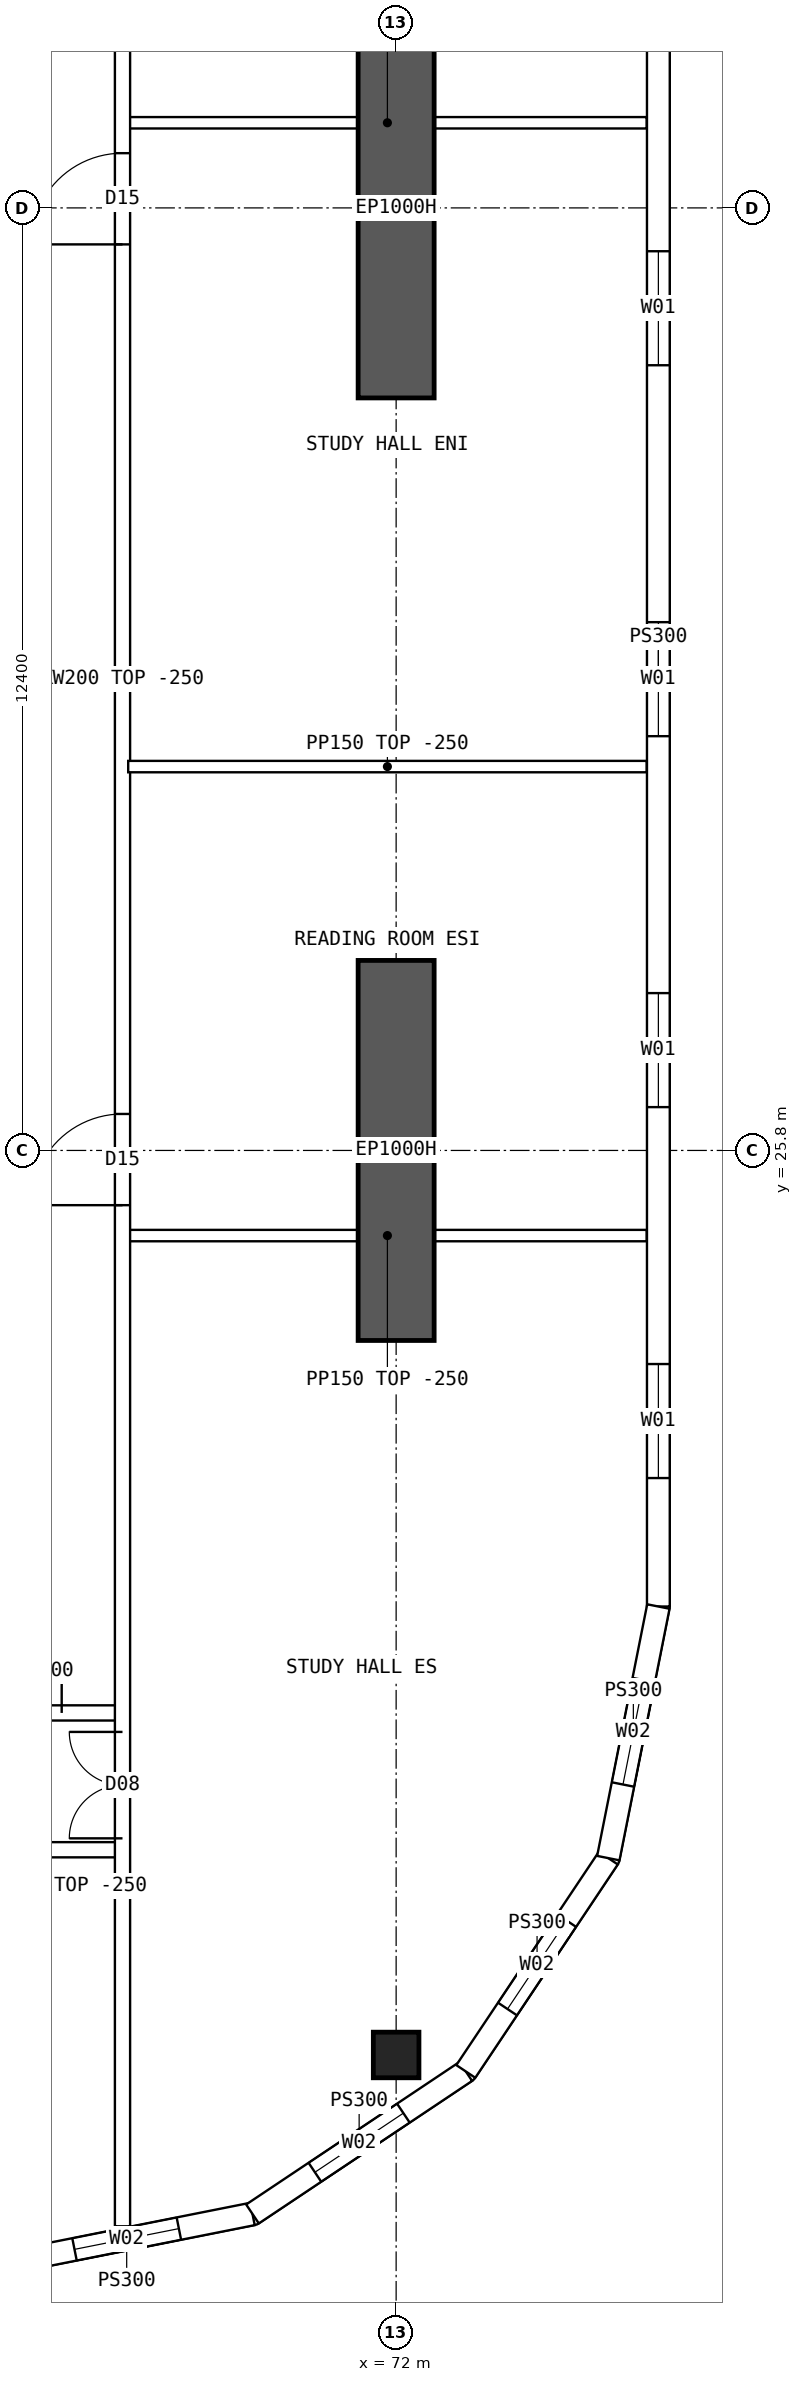
"""IFC4 building model, lengths in metres.
Left out: names, types, materials, properties, quantities, classifications, styles, units other than length and angle.
Written with IfcOpenShell. Run it as: python <this file> out.ifc"""

import sys

from ifc_helpers import new_model, si_unit, direction, frame, frame_2d, origin, origin_2d, place, context, subcontext, project, spatial, polyline, rectangle, hollow_rectangle, outline, extrude, element, fill, save


model = new_model("IFC4")
c1 = context("Model", 3, precision=1e-05, world=origin(), true_north=direction((0.0, 1.0)))
c2 = subcontext(c1, "Body", "Model", "MODEL_VIEW")
j1 = project(units=[si_unit("LENGTHUNIT", "METRE"), si_unit("PLANEANGLEUNIT", "RADIAN")], contexts=[c1])
p1 = place(None, origin())
s1 = spatial("IfcSite", under=j1, at=p1, CompositionType="ELEMENT")
p2 = place(p1, origin())
s2 = spatial("IfcBuilding", under=s1, at=p2, CompositionType="ELEMENT")
p3 = place(p2, frame((0.0, 0.0, 216.55)))
s3 = spatial("IfcBuildingStorey", under=s2, at=p3, CompositionType="ELEMENT", Elevation=216.55)
p4 = place(p3, frame((72.0, 13.9, 0.0), z_axis=(0.0, 0.0, 1.0), x_axis=(1.0, 0.0, 0.0)))
e1 = element("IfcColumn", 1, at=p4, inside=s3, PredefinedType="COLUMN", context=c2, shape_type="SweptSolid", body=[
    extrude(hollow_rectangle(XDim=0.6, YDim=0.6, WallThickness=0.06, at=origin_2d()), origin(), (0.0, 0.0, 1.0), 3.75),
])
for number, where, z_axis, x_axis in (
    (2, (72.0, 23.3, 0.0), (0.0, 0.0, 1.0), (0.0, 1.0, 0.0)),
    (3, (72.0, 35.7, 0.0), (0.0, 0.0, 1.0), (0.0, 1.0, 0.0)),
):
    element("IfcWall", number, at=place(p3, frame(where, z_axis=z_axis, x_axis=x_axis)), inside=s3, PredefinedType="SHEAR", context=c2, shape_type="SweptSolid", body=[
        extrude(rectangle(XDim=5.0, YDim=1.0, at=frame_2d((2.5, 0.0))), origin(), (0.0, 0.0, 1.0), 3.75),
    ])
p5 = place(p3, frame((75.45, 19.8, 0.0), z_axis=(0.0, 0.0, 1.0), x_axis=(0.0, 1.0, 0.0)))
e4 = element("IfcWall", 4, at=p5, inside=s3, PredefinedType="SOLIDWALL", context=c2, shape_type="SweptSolid", body=[
    extrude(outline(polyline([(-0.015, -0.15), (24.415, -0.15), (24.385, 0.15), (0.015, 0.15), (-0.015, -0.15)])), origin(), (0.0, 0.0, 1.0), 3.5),
])
p6 = place(p5, frame((1.69, 0.0, 0.9)))
e5 = element("IfcOpeningElement", 5, at=p6, cuts=e4, PredefinedType="OPENING", context=c2, shape_type="SweptSolid", body=[
    extrude(rectangle(XDim=1.5, YDim=2.0, at=frame_2d((0.75, 1.0))), frame((0.0, 0.16, 0.0), z_axis=(0.0, -1.0, 0.0), x_axis=(1.0, 0.0, 0.0)), (0.0, 0.0, 1.0), 0.32),
])
p7 = place(p5, frame((6.57, 0.0, 0.9)))
e6 = element("IfcOpeningElement", 6, at=p7, cuts=e4, PredefinedType="OPENING", context=c2, shape_type="SweptSolid", body=[
    extrude(rectangle(XDim=1.5, YDim=2.0, at=frame_2d((0.75, 1.0))), frame((0.0, 0.16, 0.0), z_axis=(0.0, -1.0, 0.0), x_axis=(1.0, 0.0, 0.0)), (0.0, 0.0, 1.0), 0.32),
])
p8 = place(p5, frame((11.45, 0.0, 0.9)))
e7 = element("IfcOpeningElement", 7, at=p8, cuts=e4, PredefinedType="OPENING", context=c2, shape_type="SweptSolid", body=[
    extrude(rectangle(XDim=1.5, YDim=2.0, at=frame_2d((0.75, 1.0))), frame((0.0, 0.16, 0.0), z_axis=(0.0, -1.0, 0.0), x_axis=(1.0, 0.0, 0.0)), (0.0, 0.0, 1.0), 0.32),
])
p9 = place(p5, frame((16.33, 0.0, 0.9)))
e8 = element("IfcOpeningElement", 8, at=p9, cuts=e4, PredefinedType="OPENING", context=c2, shape_type="SweptSolid", body=[
    extrude(rectangle(XDim=1.5, YDim=2.0, at=frame_2d((0.75, 1.0))), frame((0.0, 0.16, 0.0), z_axis=(0.0, -1.0, 0.0), x_axis=(1.0, 0.0, 0.0)), (0.0, 0.0, 1.0), 0.32),
])
p10 = place(p5, frame((21.21, 0.0, 0.9)))
e9 = element("IfcOpeningElement", 9, at=p10, cuts=e4, PredefinedType="OPENING", context=c2, shape_type="SweptSolid", body=[
    extrude(rectangle(XDim=1.5, YDim=2.0, at=frame_2d((0.75, 1.0))), frame((0.0, 0.16, 0.0), z_axis=(0.0, -1.0, 0.0), x_axis=(1.0, 0.0, 0.0)), (0.0, 0.0, 1.0), 0.32),
])
p11 = place(p3, frame((66.8, 11.15, 0.0), z_axis=(0.0, 0.0, 1.0), x_axis=(0.98078325777, 0.195100490205, 0.0)))
e10 = element("IfcWall", 10, at=p11, inside=s3, PredefinedType="SOLIDWALL", context=c2, shape_type="SweptSolid", body=[
    extrude(outline(polyline([(-0.03, -0.15), (3.405, -0.15), (3.345, 0.15), (0.03, 0.15), (-0.03, -0.15)])), origin(), (0.0, 0.0, 1.0), 3.5),
])
p12 = place(p11, frame((0.988, 0.0, 0.9)))
e11 = element("IfcOpeningElement", 11, at=p12, cuts=e10, PredefinedType="OPENING", context=c2, shape_type="SweptSolid", body=[
    extrude(rectangle(XDim=1.4, YDim=1.8, at=frame_2d((0.7, 0.9))), frame((0.0, 0.16, 0.0), z_axis=(0.0, -1.0, 0.0), x_axis=(1.0, 0.0, 0.0)), (0.0, 0.0, 1.0), 0.32),
])
p13 = place(p3, frame((70.11, 11.808, 0.0), z_axis=(0.0, 0.0, 1.0), x_axis=(0.831460037396, 0.555584562613, 0.0)))
e12 = element("IfcWall", 12, at=p13, inside=s3, PredefinedType="SOLIDWALL", context=c2, shape_type="SweptSolid", body=[
    extrude(outline(polyline([(-0.03, -0.15), (3.405, -0.15), (3.345, 0.15), (0.03, 0.15), (-0.03, -0.15)])), origin(), (0.0, 0.0, 1.0), 3.5),
])
p14 = place(p13, frame((0.988, 0.0, 0.9)))
e13 = element("IfcOpeningElement", 13, at=p14, cuts=e12, PredefinedType="OPENING", context=c2, shape_type="SweptSolid", body=[
    extrude(rectangle(XDim=1.4, YDim=1.8, at=frame_2d((0.7, 0.9))), frame((0.0, 0.16, 0.0), z_axis=(0.0, -1.0, 0.0), x_axis=(1.0, 0.0, 0.0)), (0.0, 0.0, 1.0), 0.32),
])
p15 = place(p3, frame((72.917, 13.684, 0.0), z_axis=(0.0, 0.0, 1.0), x_axis=(0.555567969291, 0.831471124873, 0.0)))
e14 = element("IfcWall", 14, at=p15, inside=s3, PredefinedType="SOLIDWALL", context=c2, shape_type="SweptSolid", body=[
    extrude(outline(polyline([(-0.03, -0.15), (3.405, -0.15), (3.345, 0.15), (0.03, 0.15), (-0.03, -0.15)])), origin(), (0.0, 0.0, 1.0), 3.5),
])
p16 = place(p15, frame((0.988, 0.0, 0.9)))
e15 = element("IfcOpeningElement", 15, at=p16, cuts=e14, PredefinedType="OPENING", context=c2, shape_type="SweptSolid", body=[
    extrude(rectangle(XDim=1.4, YDim=1.8, at=frame_2d((0.7, 0.9))), frame((0.0, 0.16, 0.0), z_axis=(0.0, -1.0, 0.0), x_axis=(1.0, 0.0, 0.0)), (0.0, 0.0, 1.0), 0.32),
])
p17 = place(p3, frame((74.792, 16.49, 0.0), z_axis=(0.0, 0.0, 1.0), x_axis=(0.19508664885, 0.980786011034, 0.0)))
e16 = element("IfcWall", 16, at=p17, inside=s3, PredefinedType="SOLIDWALL", context=c2, shape_type="SweptSolid", body=[
    extrude(outline(polyline([(-0.03, -0.15), (3.39, -0.15), (3.36, 0.15), (0.03, 0.15), (-0.03, -0.15)])), origin(), (0.0, 0.0, 1.0), 3.5),
])
p18 = place(p17, frame((0.988, 0.0, 0.9)))
e17 = element("IfcOpeningElement", 17, at=p18, cuts=e16, PredefinedType="OPENING", context=c2, shape_type="SweptSolid", body=[
    extrude(rectangle(XDim=1.4, YDim=1.8, at=frame_2d((0.7, 0.9))), frame((0.0, 0.16, 0.0), z_axis=(0.0, -1.0, 0.0), x_axis=(1.0, 0.0, 0.0)), (0.0, 0.0, 1.0), 0.32),
])
p19 = place(p3, frame((66.35, 16.6, 0.0), z_axis=(0.0, 0.0, 1.0), x_axis=(1.0, 0.0, 0.0)))
e18 = element("IfcWall", 18, at=p19, inside=s3, PredefinedType="SOLIDWALL", context=c2, shape_type="SweptSolid", body=[
    extrude(rectangle(XDim=2.05, YDim=0.2, at=frame_2d((1.025, 0.0))), origin(), (0.0, 0.0, 1.0), 3.5),
])
p20 = place(p19, frame((0.2, 0.0, 0.0)))
e19 = element("IfcOpeningElement", 19, at=p20, cuts=e18, PredefinedType="OPENING", context=c2, shape_type="SweptSolid", body=[
    extrude(rectangle(XDim=0.9, YDim=2.1, at=frame_2d((0.45, 1.05))), frame((0.0, 0.11, 0.0), z_axis=(0.0, -1.0, 0.0), x_axis=(1.0, 0.0, 0.0)), (0.0, 0.0, 1.0), 0.22),
])
p21 = place(p3, frame((66.35, 18.4, 0.0), z_axis=(0.0, 0.0, 1.0), x_axis=(1.0, 0.0, 0.0)))
e20 = element("IfcWall", 20, at=p21, inside=s3, PredefinedType="SOLIDWALL", context=c2, shape_type="SweptSolid", body=[
    extrude(rectangle(XDim=2.05, YDim=0.2, at=frame_2d((1.025, 0.0))), origin(), (0.0, 0.0, 1.0), 3.5),
])
p22 = place(p21, frame((0.05, 0.0, 0.0)))
e21 = element("IfcOpeningElement", 21, at=p22, cuts=e20, PredefinedType="OPENING", context=c2, shape_type="SweptSolid", body=[
    extrude(rectangle(XDim=1.2, YDim=2.1, at=frame_2d((0.6, 1.05))), frame((0.0, 0.11, 0.0), z_axis=(0.0, -1.0, 0.0), x_axis=(1.0, 0.0, 0.0)), (0.0, 0.0, 1.0), 0.22),
])
p23 = place(p3, frame((68.475, 30.85, 0.0), z_axis=(0.0, 0.0, 1.0), x_axis=(1.0, 0.0, 0.0)))
e22 = element("IfcWall", 22, at=p23, inside=s3, PredefinedType="PARTITIONING", context=c2, shape_type="SweptSolid", body=[
    extrude(outline(polyline([(0.0, 0.0), (6.82, 0.0), (6.82, 3.5), (3.827, 3.5), (3.825, 3.05), (3.227, 3.05), (3.225, 3.5), (0.0, 3.5), (0.0, 0.0)])), frame((0.0, 0.075, 0.0), z_axis=(0.0, -1.0, 0.0), x_axis=(1.0, 0.0, 0.0)), (0.0, 0.0, 1.0), 0.15),
])
p24 = place(p3, frame((68.4, 11.646, 0.0), z_axis=(0.0, 0.0, 1.0), x_axis=(0.0, 1.0, 0.0)))
e23 = element("IfcWall", 23, at=p24, inside=s3, PredefinedType="SOLIDWALL", context=c2, shape_type="SweptSolid", body=[
    extrude(rectangle(XDim=40.708, YDim=0.2, at=frame_2d((20.354, 0.0))), origin(), (0.0, 0.0, 1.0), 3.5),
])
p25 = place(p24, frame((13.434, 0.0, 0.0)))
e24 = element("IfcOpeningElement", 24, at=p25, cuts=e23, PredefinedType="OPENING", context=c2, shape_type="SweptSolid", body=[
    extrude(rectangle(XDim=1.2, YDim=2.1, at=frame_2d((0.6, 1.05))), frame((0.0, 0.11, 0.0), z_axis=(0.0, -1.0, 0.0), x_axis=(1.0, 0.0, 0.0)), (0.0, 0.0, 1.0), 0.22),
])
p26 = place(p24, frame((26.074, 0.0, 0.0)))
e25 = element("IfcOpeningElement", 25, at=p26, cuts=e23, PredefinedType="OPENING", context=c2, shape_type="SweptSolid", body=[
    extrude(rectangle(XDim=1.2, YDim=2.1, at=frame_2d((0.6, 1.05))), frame((0.0, 0.11, 0.0), z_axis=(0.0, -1.0, 0.0), x_axis=(1.0, 0.0, 0.0)), (0.0, 0.0, 1.0), 0.22),
])
p27 = place(p24, frame((5.104, 0.0, 0.0)))
e26 = element("IfcOpeningElement", 26, at=p27, cuts=e23, PredefinedType="OPENING", context=c2, shape_type="SweptSolid", body=[
    extrude(rectangle(XDim=1.4, YDim=2.1, at=frame_2d((0.7, 1.05))), frame((0.0, 0.11, 0.0), z_axis=(0.0, -1.0, 0.0), x_axis=(1.0, 0.0, 0.0)), (0.0, 0.0, 1.0), 0.22),
])
p28 = place(p24, frame((34.104, 0.0, 0.0)))
e27 = element("IfcOpeningElement", 27, at=p28, cuts=e23, PredefinedType="OPENING", context=c2, shape_type="SweptSolid", body=[
    extrude(rectangle(XDim=1.4, YDim=2.1, at=frame_2d((0.7, 1.05))), frame((0.0, 0.11, 0.0), z_axis=(0.0, -1.0, 0.0), x_axis=(1.0, 0.0, 0.0)), (0.0, 0.0, 1.0), 0.22),
])
for number, where, z_axis, x_axis in (
    (28, (68.475, 24.68, 0.0), (0.0, 0.0, 1.0), (1.0, 0.0, 0.0)),
    (29, (68.475, 39.32, 0.0), (0.0, 0.0, 1.0), (1.0, 0.0, 0.0)),
):
    element("IfcWall", number, at=place(p3, frame(where, z_axis=z_axis, x_axis=x_axis)), inside=s3, PredefinedType="PARTITIONING", context=c2, shape_type="SweptSolid", body=[
        extrude(rectangle(XDim=6.82, YDim=0.15, at=frame_2d((3.41, 0.0))), origin(), (0.0, 0.0, 1.0), 3.5),
    ])
p29 = place(p6, origin())
e30 = element("IfcWindow", 30, at=p29, inside=s3, PartitioningType="SINGLE_PANEL", PredefinedType="WINDOW", context=c2, shape_type="SweptSolid", body=[
    extrude(rectangle(XDim=1.5, YDim=2.0, at=frame_2d((0.75, 1.0))), frame((0.0, 0.03, 0.0), z_axis=(0.0, -1.0, 0.0), x_axis=(1.0, 0.0, 0.0)), (0.0, 0.0, 1.0), 0.06),
])
fill(e5, e30)
p30 = place(p7, origin())
e31 = element("IfcWindow", 31, at=p30, inside=s3, PartitioningType="SINGLE_PANEL", PredefinedType="WINDOW", context=c2, shape_type="SweptSolid", body=[
    extrude(rectangle(XDim=1.5, YDim=2.0, at=frame_2d((0.75, 1.0))), frame((0.0, 0.03, 0.0), z_axis=(0.0, -1.0, 0.0), x_axis=(1.0, 0.0, 0.0)), (0.0, 0.0, 1.0), 0.06),
])
fill(e6, e31)
p31 = place(p8, origin())
e32 = element("IfcWindow", 32, at=p31, inside=s3, PartitioningType="SINGLE_PANEL", PredefinedType="WINDOW", context=c2, shape_type="SweptSolid", body=[
    extrude(rectangle(XDim=1.5, YDim=2.0, at=frame_2d((0.75, 1.0))), frame((0.0, 0.03, 0.0), z_axis=(0.0, -1.0, 0.0), x_axis=(1.0, 0.0, 0.0)), (0.0, 0.0, 1.0), 0.06),
])
fill(e7, e32)
p32 = place(p9, origin())
e33 = element("IfcWindow", 33, at=p32, inside=s3, PartitioningType="SINGLE_PANEL", PredefinedType="WINDOW", context=c2, shape_type="SweptSolid", body=[
    extrude(rectangle(XDim=1.5, YDim=2.0, at=frame_2d((0.75, 1.0))), frame((0.0, 0.03, 0.0), z_axis=(0.0, -1.0, 0.0), x_axis=(1.0, 0.0, 0.0)), (0.0, 0.0, 1.0), 0.06),
])
fill(e8, e33)
p33 = place(p12, origin())
e34 = element("IfcWindow", 34, at=p33, inside=s3, PartitioningType="SINGLE_PANEL", PredefinedType="WINDOW", context=c2, shape_type="SweptSolid", body=[
    extrude(rectangle(XDim=1.4, YDim=1.8, at=frame_2d((0.7, 0.9))), frame((0.0, 0.03, 0.0), z_axis=(0.0, -1.0, 0.0), x_axis=(1.0, 0.0, 0.0)), (0.0, 0.0, 1.0), 0.06),
])
fill(e11, e34)
p34 = place(p14, origin())
e35 = element("IfcWindow", 35, at=p34, inside=s3, PartitioningType="SINGLE_PANEL", PredefinedType="WINDOW", context=c2, shape_type="SweptSolid", body=[
    extrude(rectangle(XDim=1.4, YDim=1.8, at=frame_2d((0.7, 0.9))), frame((0.0, 0.03, 0.0), z_axis=(0.0, -1.0, 0.0), x_axis=(1.0, 0.0, 0.0)), (0.0, 0.0, 1.0), 0.06),
])
fill(e13, e35)
p35 = place(p16, origin())
e36 = element("IfcWindow", 36, at=p35, inside=s3, PartitioningType="SINGLE_PANEL", PredefinedType="WINDOW", context=c2, shape_type="SweptSolid", body=[
    extrude(rectangle(XDim=1.4, YDim=1.8, at=frame_2d((0.7, 0.9))), frame((0.0, 0.03, 0.0), z_axis=(0.0, -1.0, 0.0), x_axis=(1.0, 0.0, 0.0)), (0.0, 0.0, 1.0), 0.06),
])
fill(e15, e36)
p36 = place(p18, origin())
e37 = element("IfcWindow", 37, at=p36, inside=s3, PartitioningType="SINGLE_PANEL", PredefinedType="WINDOW", context=c2, shape_type="SweptSolid", body=[
    extrude(rectangle(XDim=1.4, YDim=1.8, at=frame_2d((0.7, 0.9))), frame((0.0, 0.03, 0.0), z_axis=(0.0, -1.0, 0.0), x_axis=(1.0, 0.0, 0.0)), (0.0, 0.0, 1.0), 0.06),
])
fill(e17, e37)
p37 = place(p22, origin())
e38 = element("IfcDoor", 38, at=p37, inside=s3, OperationType="DOUBLE_DOOR_SINGLE_SWING", PredefinedType="DOOR", context=c2, shape_type="SweptSolid", body=[
    extrude(rectangle(XDim=1.2, YDim=2.1, at=frame_2d((0.6, 1.05))), frame((0.0, 0.025, 0.0), z_axis=(0.0, -1.0, 0.0), x_axis=(1.0, 0.0, 0.0)), (0.0, 0.0, 1.0), 0.05),
])
fill(e21, e38)
p38 = place(p25, origin())
e39 = element("IfcDoor", 39, at=p38, inside=s3, OperationType="SINGLE_SWING_LEFT", PredefinedType="DOOR", context=c2, shape_type="SweptSolid", body=[
    extrude(rectangle(XDim=1.2, YDim=2.1, at=frame_2d((0.6, 1.05))), frame((0.0, 0.025, 0.0), z_axis=(0.0, -1.0, 0.0), x_axis=(1.0, 0.0, 0.0)), (0.0, 0.0, 1.0), 0.05),
])
fill(e24, e39)
p39 = place(p26, origin())
e40 = element("IfcDoor", 40, at=p39, inside=s3, OperationType="SINGLE_SWING_LEFT", PredefinedType="DOOR", context=c2, shape_type="SweptSolid", body=[
    extrude(rectangle(XDim=1.2, YDim=2.1, at=frame_2d((0.6, 1.05))), frame((0.0, 0.025, 0.0), z_axis=(0.0, -1.0, 0.0), x_axis=(1.0, 0.0, 0.0)), (0.0, 0.0, 1.0), 0.05),
])
fill(e25, e40)
p40 = place(p27, origin())
e41 = element("IfcDoor", 41, at=p40, inside=s3, OperationType="DOUBLE_DOOR_SINGLE_SWING", PredefinedType="DOOR", context=c2, shape_type="SweptSolid", body=[
    extrude(rectangle(XDim=1.4, YDim=2.1, at=frame_2d((0.7, 1.05))), frame((0.0, 0.025, 0.0), z_axis=(0.0, -1.0, 0.0), x_axis=(1.0, 0.0, 0.0)), (0.0, 0.0, 1.0), 0.05),
])
fill(e26, e41)
save(model, sys.argv[1])
